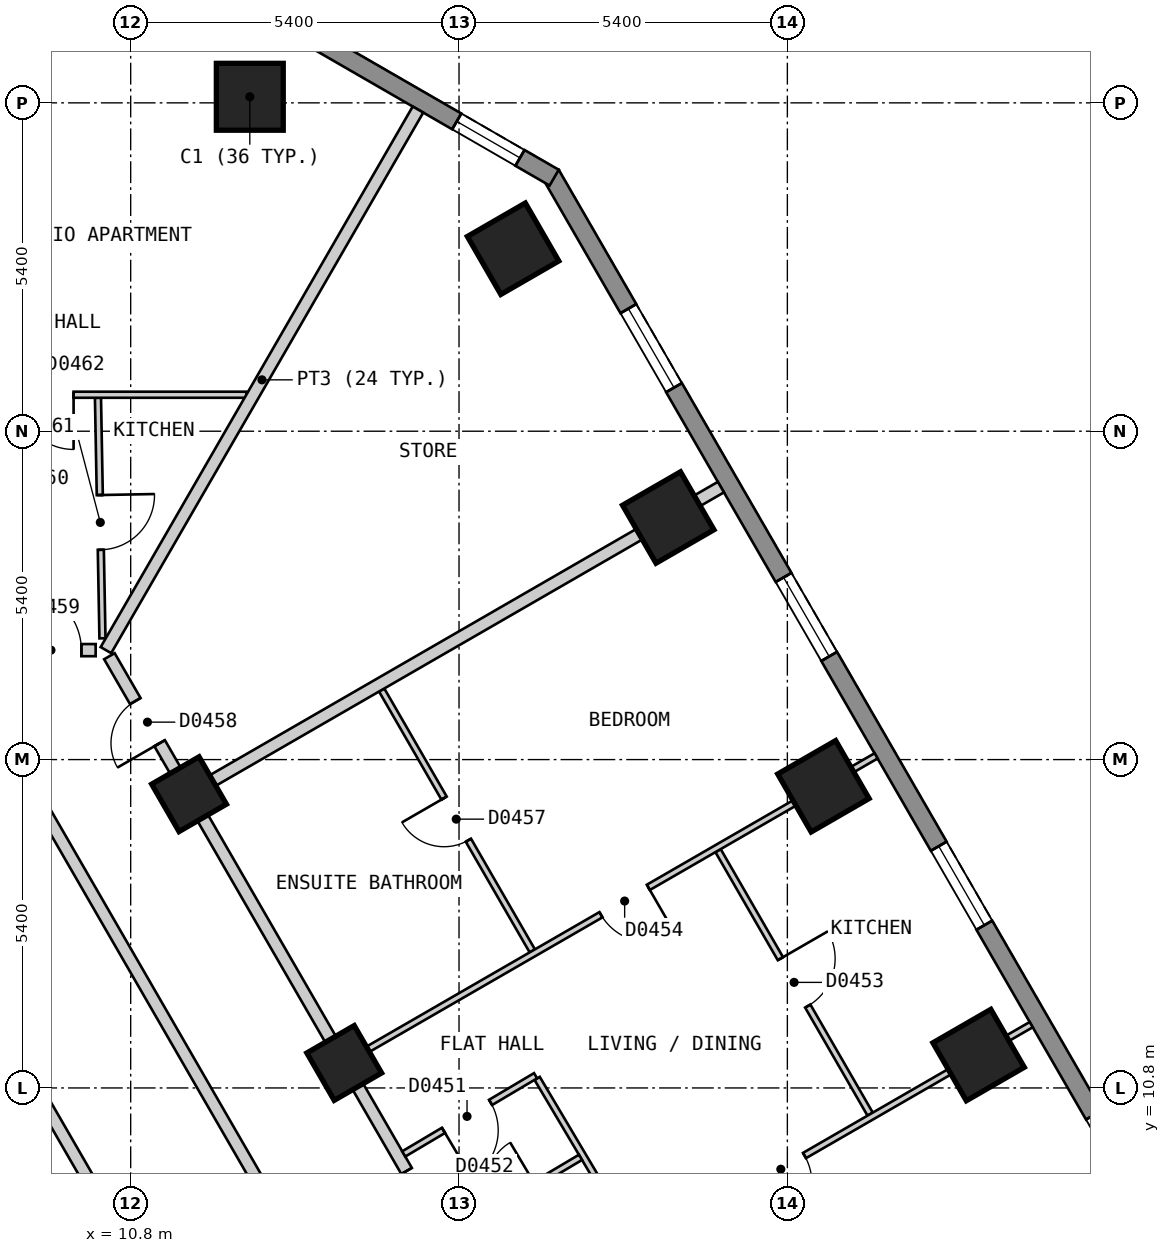
"""IFC4 building model, lengths in metres.
Left out: names, types, materials, properties, quantities, classifications, styles, units other than length and angle.
Written with IfcOpenShell. Run it as: python <this file> out.ifc"""

import sys

from ifc_helpers import new_model, si_unit, direction, frame, frame_2d, origin, origin_2d, place, context, subcontext, project, spatial, polyline, rectangle, outline, extrude, element, fill, save


model = new_model("IFC4")
c1 = context("Model", 3, precision=1e-05, world=origin(), true_north=direction((0.0, 1.0)))
c2 = subcontext(c1, "Body", "Model", "MODEL_VIEW")
j1 = project(units=[si_unit("LENGTHUNIT", "METRE"), si_unit("PLANEANGLEUNIT", "RADIAN")], contexts=[c1])
p1 = place(None, origin())
s1 = spatial("IfcSite", under=j1, at=p1, CompositionType="ELEMENT")
p2 = place(p1, origin())
s2 = spatial("IfcBuilding", under=s1, at=p2, CompositionType="ELEMENT")
p3 = place(p2, frame((0.0, 0.0, 32.4)))
s3 = spatial("IfcBuildingStorey", under=s2, at=p3, CompositionType="ELEMENT", Elevation=32.4)
for number, where, z_axis, x_axis in (
    (1, (12.759, 27.1, 0.0), (0.0, 0.0, 1.0), (-1.0, 0.0, 0.0)),
    (2, (24.745, 11.341, 0.0), (0.0, 0.0, 1.0), (-0.5, 0.866, 0.0)),
    (3, (22.193, 15.761, 0.0), (0.0, 0.0, 1.0), (-0.5, 0.866, 0.0)),
    (4, (19.641, 20.181, 0.0), (0.0, 0.0, 1.0), (-0.5, 0.866, 0.0)),
    (5, (17.089, 24.601, 0.0), (0.0, 0.0, 1.0), (-0.5, 0.866, 0.0)),
):
    element("IfcColumn", number, at=place(p3, frame(where, z_axis=z_axis, x_axis=x_axis)), inside=s3, PredefinedType="COLUMN", context=c2, shape_type="SweptSolid", body=[
        extrude(rectangle(XDim=1.1, YDim=1.1, at=origin_2d()), origin(), (0.0, 0.0, 1.0), 3.0),
    ])
for number, where, z_axis, x_axis in (
    (6, (14.312, 11.211, 0.0), (0.0, 0.0, 1.0), (-0.5, 0.866, 0.0)),
    (7, (11.76, 15.631, 0.0), (0.0, 0.0, 1.0), (-0.5, 0.866, 0.0)),
):
    element("IfcColumn", number, at=place(p3, frame(where, z_axis=z_axis, x_axis=x_axis)), inside=s3, PredefinedType="COLUMN", context=c2, shape_type="SweptSolid", body=[
        extrude(rectangle(XDim=0.9, YDim=0.9, at=origin_2d()), origin(), (0.0, 0.0, 1.0), 3.0),
    ])
p4 = place(p3, frame((31.22, 2.425, 0.0), z_axis=(0.0, 0.0, 1.0), x_axis=(-0.500001938803, 0.866024284413, 0.0)))
e8 = element("IfcWall", 8, at=p4, inside=s3, PredefinedType="SOLIDWALL", context=c2, shape_type="SweptSolid", body=[
    extrude(outline(polyline([(0.0, -0.15), (27.02, -0.15), (26.94, 0.15), (0.08, 0.15), (0.0, -0.15)])), origin(), (0.0, 0.0, 1.0), 2.7),
])
p5 = place(p4, frame((2.553, 0.0, 0.15)))
e9 = element("IfcOpeningElement", 9, at=p5, cuts=e8, PredefinedType="OPENING", context=c2, shape_type="SweptSolid", body=[
    extrude(rectangle(XDim=1.5, YDim=2.1, at=frame_2d((0.75, 1.05))), frame((0.0, 0.16, 0.0), z_axis=(0.0, -1.0, 0.0), x_axis=(1.0, 0.0, 0.0)), (0.0, 0.0, 1.0), 0.32),
])
p6 = place(p4, frame((7.657, 0.0, 0.15)))
e10 = element("IfcOpeningElement", 10, at=p6, cuts=e8, PredefinedType="OPENING", context=c2, shape_type="SweptSolid", body=[
    extrude(rectangle(XDim=1.5, YDim=2.1, at=frame_2d((0.75, 1.05))), frame((0.0, 0.16, 0.0), z_axis=(0.0, -1.0, 0.0), x_axis=(1.0, 0.0, 0.0)), (0.0, 0.0, 1.0), 0.32),
])
p7 = place(p4, frame((12.761, 0.0, 0.15)))
e11 = element("IfcOpeningElement", 11, at=p7, cuts=e8, PredefinedType="OPENING", context=c2, shape_type="SweptSolid", body=[
    extrude(rectangle(XDim=1.5, YDim=2.1, at=frame_2d((0.75, 1.05))), frame((0.0, 0.16, 0.0), z_axis=(0.0, -1.0, 0.0), x_axis=(1.0, 0.0, 0.0)), (0.0, 0.0, 1.0), 0.32),
])
p8 = place(p4, frame((17.865, 0.0, 0.15)))
e12 = element("IfcOpeningElement", 12, at=p8, cuts=e8, PredefinedType="OPENING", context=c2, shape_type="SweptSolid", body=[
    extrude(rectangle(XDim=1.5, YDim=2.1, at=frame_2d((0.75, 1.05))), frame((0.0, 0.16, 0.0), z_axis=(0.0, -1.0, 0.0), x_axis=(1.0, 0.0, 0.0)), (0.0, 0.0, 1.0), 0.32),
])
p9 = place(p4, frame((22.969, 0.0, 0.15)))
e13 = element("IfcOpeningElement", 13, at=p9, cuts=e8, PredefinedType="OPENING", context=c2, shape_type="SweptSolid", body=[
    extrude(rectangle(XDim=1.5, YDim=2.1, at=frame_2d((0.75, 1.05))), frame((0.0, 0.16, 0.0), z_axis=(0.0, -1.0, 0.0), x_axis=(1.0, 0.0, 0.0)), (0.0, 0.0, 1.0), 0.32),
])
p10 = place(p3, frame((17.765, 25.77, 0.0), z_axis=(0.0, 0.0, 1.0), x_axis=(-0.866010750942, 0.50002537861, 0.0)))
e14 = element("IfcWall", 14, at=p10, inside=s3, PredefinedType="SOLIDWALL", context=c2, shape_type="SweptSolid", body=[
    extrude(outline(polyline([(0.0, -0.15), (5.0, -0.15), (4.919, 0.15), (0.08, 0.15), (0.0, -0.15)])), origin(), (0.0, 0.0, 1.0), 2.7),
])
p11 = place(p10, frame((0.65, 0.0, 0.15)))
e15 = element("IfcOpeningElement", 15, at=p11, cuts=e14, PredefinedType="OPENING", context=c2, shape_type="SweptSolid", body=[
    extrude(rectangle(XDim=1.2, YDim=2.1, at=frame_2d((0.6, 1.05))), frame((0.0, 0.16, 0.0), z_axis=(0.0, -1.0, 0.0), x_axis=(1.0, 0.0, 0.0)), (0.0, 0.0, 1.0), 0.32),
])
p12 = place(p3, frame((6.409, 15.7, 0.0), z_axis=(0.0, 0.0, 1.0), x_axis=(0.499930377127, -0.866065596838, 0.0)))
e16 = element("IfcWall", 16, at=p12, inside=s3, PredefinedType="PARTITIONING", context=c2, shape_type="SweptSolid", body=[
    extrude(rectangle(XDim=8.775, YDim=0.2, at=frame_2d((4.388, 0.0))), origin(), (0.0, 0.0, 1.0), 2.7),
])
p13 = place(p3, frame((9.18, 15.7, 0.0), z_axis=(0.0, 0.0, 1.0), x_axis=(0.500003652032, -0.866023295272, 0.0)))
e17 = element("IfcWall", 17, at=p13, inside=s3, PredefinedType="PARTITIONING", context=c2, shape_type="SweptSolid", body=[
    extrude(rectangle(XDim=18.012, YDim=0.2, at=frame_2d((9.006, 0.0))), origin(), (0.0, 0.0, 1.0), 2.7),
])
p14 = place(p13, frame((8.556, 0.0, 0.0)))
e18 = element("IfcOpeningElement", 18, at=p14, cuts=e17, PredefinedType="OPENING", context=c2, shape_type="SweptSolid", body=[
    extrude(rectangle(XDim=0.9, YDim=2.1, at=frame_2d((0.45, 1.05))), frame((0.0, 0.11, 0.0), z_axis=(0.0, -1.0, 0.0), x_axis=(1.0, 0.0, 0.0)), (0.0, 0.0, 1.0), 0.22),
])
p15 = place(p3, frame((10.45, 17.9, 0.0), z_axis=(0.0, 0.0, 1.0), x_axis=(0.500034352617, -0.866005569383, 0.0)))
e19 = element("IfcWall", 19, at=p15, inside=s3, PredefinedType="PARTITIONING", context=c2, shape_type="SweptSolid", body=[
    extrude(rectangle(XDim=20.553, YDim=0.2, at=frame_2d((10.276, 0.0))), origin(), (0.0, 0.0, 1.0), 2.7),
])
p16 = place(p15, frame((9.775, 0.0, 0.0)))
e20 = element("IfcOpeningElement", 20, at=p16, cuts=e19, PredefinedType="OPENING", context=c2, shape_type="SweptSolid", body=[
    extrude(rectangle(XDim=1.0, YDim=2.1, at=frame_2d((0.5, 1.05))), frame((0.0, 0.11, 0.0), z_axis=(0.0, -1.0, 0.0), x_axis=(1.0, 0.0, 0.0)), (0.0, 0.0, 1.0), 0.22),
])
p17 = place(p15, frame((0.852, 0.0, 0.0)))
e21 = element("IfcOpeningElement", 21, at=p17, cuts=e19, PredefinedType="OPENING", context=c2, shape_type="SweptSolid", body=[
    extrude(rectangle(XDim=0.8, YDim=2.1, at=frame_2d((0.4, 1.05))), frame((0.0, 0.11, 0.0), z_axis=(0.0, -1.0, 0.0), x_axis=(1.0, 0.0, 0.0)), (0.0, 0.0, 1.0), 0.22),
])
p18 = place(p3, frame((-10.276, 18.0, 0.0), z_axis=(0.0, 0.0, 1.0), x_axis=(1.0, 0.0, 0.0)))
e22 = element("IfcWall", 22, at=p18, inside=s3, PredefinedType="PARTITIONING", context=c2, shape_type="SweptSolid", body=[
    extrude(rectangle(XDim=20.5, YDim=0.2, at=frame_2d((10.25, 0.0))), origin(), (0.0, 0.0, 1.0), 2.7),
])
p19 = place(p18, frame((19.265, 0.0, 0.0)))
e23 = element("IfcOpeningElement", 23, at=p19, cuts=e22, PredefinedType="OPENING", context=c2, shape_type="SweptSolid", body=[
    extrude(rectangle(XDim=1.0, YDim=2.1, at=frame_2d((0.5, 1.05))), frame((0.0, 0.11, 0.0), z_axis=(0.0, -1.0, 0.0), x_axis=(1.0, 0.0, 0.0)), (0.0, 0.0, 1.0), 0.22),
])
p20 = place(p18, frame((9.775, 0.0, 0.0)))
e24 = element("IfcOpeningElement", 24, at=p20, cuts=e22, PredefinedType="OPENING", context=c2, shape_type="SweptSolid", body=[
    extrude(rectangle(XDim=1.0, YDim=2.1, at=frame_2d((0.5, 1.05))), frame((0.0, 0.11, 0.0), z_axis=(0.0, -1.0, 0.0), x_axis=(1.0, 0.0, 0.0)), (0.0, 0.0, 1.0), 0.22),
])
p21 = place(p18, frame((4.671, 0.0, 0.0)))
e25 = element("IfcOpeningElement", 25, at=p21, cuts=e22, PredefinedType="OPENING", context=c2, shape_type="SweptSolid", body=[
    extrude(rectangle(XDim=1.0, YDim=2.1, at=frame_2d((0.5, 1.05))), frame((0.0, 0.11, 0.0), z_axis=(0.0, -1.0, 0.0), x_axis=(1.0, 0.0, 0.0)), (0.0, 0.0, 1.0), 0.22),
])
p22 = place(p3, frame((17.485, 10.957, 0.0), z_axis=(0.0, 0.0, 1.0), x_axis=(0.510324709283, -0.859981796956, 0.0)))
e26 = element("IfcWall", 26, at=p22, inside=s3, PredefinedType="PARTITIONING", context=c2, shape_type="SweptSolid", body=[
    extrude(rectangle(XDim=3.215, YDim=0.1, at=frame_2d((1.608, 0.0))), origin(), (0.0, 0.0, 1.0), 2.7),
])
p23 = place(p3, frame((14.928, 17.344, 0.0), z_axis=(0.0, 0.0, 1.0), x_axis=(0.500029609304, -0.86600830817, 0.0)))
e27 = element("IfcWall", 27, at=p23, inside=s3, PredefinedType="PARTITIONING", context=c2, shape_type="SweptSolid", body=[
    extrude(rectangle(XDim=4.954, YDim=0.1, at=frame_2d((2.477, 0.0))), origin(), (0.0, 0.0, 1.0), 2.7),
])
p24 = place(p23, frame((2.052, 0.0, 0.0)))
e28 = element("IfcOpeningElement", 28, at=p24, cuts=e27, PredefinedType="OPENING", context=c2, shape_type="SweptSolid", body=[
    extrude(rectangle(XDim=0.8, YDim=2.1, at=frame_2d((0.4, 1.05))), frame((0.0, 0.06, 0.0), z_axis=(0.0, -1.0, 0.0), x_axis=(1.0, 0.0, 0.0)), (0.0, 0.0, 1.0), 0.12),
])
p25 = place(p3, frame((20.46, 14.703, 0.0), z_axis=(0.0, 0.0, 1.0), x_axis=(0.499918186652, -0.866072633591, 0.0)))
e29 = element("IfcWall", 29, at=p25, inside=s3, PredefinedType="PARTITIONING", context=c2, shape_type="SweptSolid", body=[
    extrude(rectangle(XDim=5.003, YDim=0.1, at=frame_2d((2.501, 0.0))), origin(), (0.0, 0.0, 1.0), 2.7),
])
p26 = place(p25, frame((2.052, 0.0, 0.0)))
e30 = element("IfcOpeningElement", 30, at=p26, cuts=e29, PredefinedType="OPENING", context=c2, shape_type="SweptSolid", body=[
    extrude(rectangle(XDim=0.9, YDim=2.1, at=frame_2d((0.45, 1.05))), frame((0.0, 0.06, 0.0), z_axis=(0.0, -1.0, 0.0), x_axis=(1.0, 0.0, 0.0)), (0.0, 0.0, 1.0), 0.12),
])
p27 = place(p3, frame((10.262, 22.15, 0.0), z_axis=(0.0, 0.0, 1.0), x_axis=(0.018696971826, -0.999825196344, 0.0)))
e31 = element("IfcWall", 31, at=p27, inside=s3, PredefinedType="PARTITIONING", context=c2, shape_type="SweptSolid", body=[
    extrude(rectangle(XDim=3.957, YDim=0.1, at=frame_2d((1.978, 0.0))), origin(), (0.0, 0.0, 1.0), 2.7),
])
p28 = place(p27, frame((1.6, 0.0, 0.0)))
e32 = element("IfcOpeningElement", 32, at=p28, cuts=e31, PredefinedType="OPENING", context=c2, shape_type="SweptSolid", body=[
    extrude(rectangle(XDim=0.9, YDim=2.1, at=frame_2d((0.45, 1.05))), frame((0.0, 0.06, 0.0), z_axis=(0.0, -1.0, 0.0), x_axis=(1.0, 0.0, 0.0)), (0.0, 0.0, 1.0), 0.12),
])
p29 = place(p3, frame((7.755, 22.2, 0.0), z_axis=(0.0, 0.0, 1.0), x_axis=(1.0, 0.0, 0.0)))
e33 = element("IfcWall", 33, at=p29, inside=s3, PredefinedType="PARTITIONING", context=c2, shape_type="SweptSolid", body=[
    extrude(rectangle(XDim=4.947, YDim=0.1, at=frame_2d((2.474, 0.0))), origin(), (0.0, 0.0, 1.0), 2.7),
])
p30 = place(p29, frame((1.206, 0.0, 0.0)))
e34 = element("IfcOpeningElement", 34, at=p30, cuts=e33, PredefinedType="OPENING", context=c2, shape_type="SweptSolid", body=[
    extrude(rectangle(XDim=0.9, YDim=2.1, at=frame_2d((0.45, 1.05))), frame((0.0, 0.06, 0.0), z_axis=(0.0, -1.0, 0.0), x_axis=(1.0, 0.0, 0.0)), (0.0, 0.0, 1.0), 0.12),
])
p31 = place(p3, frame((16.95, 6.841, 0.0), z_axis=(0.0, 0.0, 1.0), x_axis=(0.866022959057, 0.500004234368, 0.0)))
e35 = element("IfcWall", 35, at=p31, inside=s3, PredefinedType="PARTITIONING", context=c2, shape_type="SweptSolid", body=[
    extrude(rectangle(XDim=10.0, YDim=0.1, at=frame_2d((5.0, 0.0))), origin(), (0.0, 0.0, 1.0), 2.7),
])
p32 = place(p31, frame((4.795, 0.0, 0.0)))
e36 = element("IfcOpeningElement", 36, at=p32, cuts=e35, PredefinedType="OPENING", context=c2, shape_type="SweptSolid", body=[
    extrude(rectangle(XDim=0.9, YDim=2.1, at=frame_2d((0.45, 1.05))), frame((0.0, 0.06, 0.0), z_axis=(0.0, -1.0, 0.0), x_axis=(1.0, 0.0, 0.0)), (0.0, 0.0, 1.0), 0.12),
])
p33 = place(p3, frame((14.399, 11.261, 0.0), z_axis=(0.0, 0.0, 1.0), x_axis=(0.866022959057, 0.500004234368, 0.0)))
e37 = element("IfcWall", 37, at=p33, inside=s3, PredefinedType="PARTITIONING", context=c2, shape_type="SweptSolid", body=[
    extrude(rectangle(XDim=10.0, YDim=0.1, at=frame_2d((5.0, 0.0))), origin(), (0.0, 0.0, 1.0), 2.7),
])
p34 = place(p33, frame((4.775, 0.0, 0.0)))
e38 = element("IfcOpeningElement", 38, at=p34, cuts=e37, PredefinedType="OPENING", context=c2, shape_type="SweptSolid", body=[
    extrude(rectangle(XDim=0.9, YDim=2.1, at=frame_2d((0.45, 1.05))), frame((0.0, 0.06, 0.0), z_axis=(0.0, -1.0, 0.0), x_axis=(1.0, 0.0, 0.0)), (0.0, 0.0, 1.0), 0.12),
])
p35 = place(p3, frame((16.057, 8.389, 0.0), z_axis=(0.0, 0.0, 1.0), x_axis=(0.860077993161, 0.510162567893, 0.0)))
e39 = element("IfcWall", 39, at=p35, inside=s3, PredefinedType="PARTITIONING", context=c2, shape_type="SweptSolid", body=[
    extrude(rectangle(XDim=2.49, YDim=0.1, at=frame_2d((1.245, 0.0))), origin(), (0.0, 0.0, 1.0), 2.7),
])
p36 = place(p35, frame((0.819, 0.0, 0.0)))
e40 = element("IfcOpeningElement", 40, at=p36, cuts=e39, PredefinedType="OPENING", context=c2, shape_type="SweptSolid", body=[
    extrude(rectangle(XDim=0.8, YDim=2.1, at=frame_2d((0.4, 1.05))), frame((0.0, 0.06, 0.0), z_axis=(0.0, -1.0, 0.0), x_axis=(1.0, 0.0, 0.0)), (0.0, 0.0, 1.0), 0.12),
])
p37 = place(p3, frame((15.291, 9.715, 0.0), z_axis=(0.0, 0.0, 1.0), x_axis=(0.860088508644, 0.51014483953, 0.0)))
e41 = element("IfcWall", 41, at=p37, inside=s3, PredefinedType="PARTITIONING", context=c2, shape_type="SweptSolid", body=[
    extrude(rectangle(XDim=2.521, YDim=0.1, at=frame_2d((1.26, 0.0))), origin(), (0.0, 0.0, 1.0), 2.7),
])
p38 = place(p37, frame((0.76, 0.0, 0.0)))
e42 = element("IfcOpeningElement", 42, at=p38, cuts=e41, PredefinedType="OPENING", context=c2, shape_type="SweptSolid", body=[
    extrude(rectangle(XDim=0.9, YDim=2.1, at=frame_2d((0.45, 1.05))), frame((0.0, 0.06, 0.0), z_axis=(0.0, -1.0, 0.0), x_axis=(1.0, 0.0, 0.0)), (0.0, 0.0, 1.0), 0.12),
])
p39 = place(p3, frame((10.393, 18.0, 0.0), z_axis=(0.0, 0.0, 1.0), x_axis=(0.499945497007, 0.866056868816, 0.0)))
e43 = element("IfcWall", 43, at=p39, inside=s3, PredefinedType="PARTITIONING", context=c2, shape_type="SweptSolid", body=[
    extrude(rectangle(XDim=10.265, YDim=0.2, at=frame_2d((5.132, 0.0))), origin(), (0.0, 0.0, 1.0), 2.7),
])
p40 = place(p3, frame((11.847, 15.681, 0.0), z_axis=(0.0, 0.0, 1.0), x_axis=(0.866022959057, 0.500004234368, 0.0)))
e44 = element("IfcWall", 44, at=p40, inside=s3, PredefinedType="PARTITIONING", context=c2, shape_type="SweptSolid", body=[
    extrude(rectangle(XDim=10.0, YDim=0.2, at=frame_2d((5.0, 0.0))), origin(), (0.0, 0.0, 1.0), 2.7),
])
p41 = place(p7, origin())
e45 = element("IfcWindow", 45, at=p41, inside=s3, PartitioningType="SINGLE_PANEL", PredefinedType="WINDOW", context=c2, shape_type="SweptSolid", body=[
    extrude(rectangle(XDim=1.5, YDim=2.1, at=frame_2d((0.75, 1.05))), frame((0.0, 0.03, 0.0), z_axis=(0.0, -1.0, 0.0), x_axis=(1.0, 0.0, 0.0)), (0.0, 0.0, 1.0), 0.06),
])
fill(e11, e45)
p42 = place(p8, origin())
e46 = element("IfcWindow", 46, at=p42, inside=s3, PartitioningType="SINGLE_PANEL", PredefinedType="WINDOW", context=c2, shape_type="SweptSolid", body=[
    extrude(rectangle(XDim=1.5, YDim=2.1, at=frame_2d((0.75, 1.05))), frame((0.0, 0.03, 0.0), z_axis=(0.0, -1.0, 0.0), x_axis=(1.0, 0.0, 0.0)), (0.0, 0.0, 1.0), 0.06),
])
fill(e12, e46)
p43 = place(p9, origin())
e47 = element("IfcWindow", 47, at=p43, inside=s3, PartitioningType="SINGLE_PANEL", PredefinedType="WINDOW", context=c2, shape_type="SweptSolid", body=[
    extrude(rectangle(XDim=1.5, YDim=2.1, at=frame_2d((0.75, 1.05))), frame((0.0, 0.03, 0.0), z_axis=(0.0, -1.0, 0.0), x_axis=(1.0, 0.0, 0.0)), (0.0, 0.0, 1.0), 0.06),
])
fill(e13, e47)
p44 = place(p11, origin())
e48 = element("IfcWindow", 48, at=p44, inside=s3, PartitioningType="SINGLE_PANEL", PredefinedType="WINDOW", context=c2, shape_type="SweptSolid", body=[
    extrude(rectangle(XDim=1.2, YDim=2.1, at=frame_2d((0.6, 1.05))), frame((0.0, 0.03, 0.0), z_axis=(0.0, -1.0, 0.0), x_axis=(1.0, 0.0, 0.0)), (0.0, 0.0, 1.0), 0.06),
])
fill(e15, e48)
p45 = place(p16, origin())
e49 = element("IfcDoor", 49, at=p45, inside=s3, OperationType="SINGLE_SWING_RIGHT", PredefinedType="DOOR", context=c2, shape_type="SweptSolid", body=[
    extrude(rectangle(XDim=1.0, YDim=2.1, at=frame_2d((0.5, 1.05))), frame((0.0, 0.025, 0.0), z_axis=(0.0, -1.0, 0.0), x_axis=(1.0, 0.0, 0.0)), (0.0, 0.0, 1.0), 0.05),
])
fill(e20, e49)
p46 = place(p38, origin())
e50 = element("IfcDoor", 50, at=p46, inside=s3, OperationType="SINGLE_SWING_LEFT", PredefinedType="DOOR", context=c2, shape_type="SweptSolid", body=[
    extrude(rectangle(XDim=0.9, YDim=2.1, at=frame_2d((0.45, 1.05))), frame((0.0, 0.025, 0.0), z_axis=(0.0, -1.0, 0.0), x_axis=(1.0, 0.0, 0.0)), (0.0, 0.0, 1.0), 0.05),
])
fill(e42, e50)
p47 = place(p26, origin())
e51 = element("IfcDoor", 51, at=p47, inside=s3, OperationType="SINGLE_SWING_LEFT", PredefinedType="DOOR", context=c2, shape_type="SweptSolid", body=[
    extrude(rectangle(XDim=0.9, YDim=2.1, at=frame_2d((0.45, 1.05))), frame((0.0, 0.025, 0.0), z_axis=(0.0, -1.0, 0.0), x_axis=(1.0, 0.0, 0.0)), (0.0, 0.0, 1.0), 0.05),
])
fill(e30, e51)
p48 = place(p34, origin())
e52 = element("IfcDoor", 52, at=p48, inside=s3, OperationType="SINGLE_SWING_RIGHT", PredefinedType="DOOR", context=c2, shape_type="SweptSolid", body=[
    extrude(rectangle(XDim=0.9, YDim=2.1, at=frame_2d((0.45, 1.05))), frame((0.0, 0.025, 0.0), z_axis=(0.0, -1.0, 0.0), x_axis=(1.0, 0.0, 0.0)), (0.0, 0.0, 1.0), 0.05),
])
fill(e38, e52)
p49 = place(p32, origin())
e53 = element("IfcDoor", 53, at=p49, inside=s3, OperationType="SINGLE_SWING_LEFT", PredefinedType="DOOR", context=c2, shape_type="SweptSolid", body=[
    extrude(rectangle(XDim=0.9, YDim=2.1, at=frame_2d((0.45, 1.05))), frame((0.0, 0.025, 0.0), z_axis=(0.0, -1.0, 0.0), x_axis=(1.0, 0.0, 0.0)), (0.0, 0.0, 1.0), 0.05),
])
fill(e36, e53)
p50 = place(p24, origin())
e54 = element("IfcDoor", 54, at=p50, inside=s3, OperationType="SINGLE_SWING_LEFT", PredefinedType="DOOR", context=c2, shape_type="SweptSolid", body=[
    extrude(rectangle(XDim=0.8, YDim=2.1, at=frame_2d((0.4, 1.05))), frame((0.0, 0.025, 0.0), z_axis=(0.0, -1.0, 0.0), x_axis=(1.0, 0.0, 0.0)), (0.0, 0.0, 1.0), 0.05),
])
fill(e28, e54)
p51 = place(p17, origin())
e55 = element("IfcDoor", 55, at=p51, inside=s3, OperationType="SINGLE_SWING_RIGHT", PredefinedType="DOOR", context=c2, shape_type="SweptSolid", body=[
    extrude(rectangle(XDim=0.8, YDim=2.1, at=frame_2d((0.4, 1.05))), frame((0.0, 0.025, 0.0), z_axis=(0.0, -1.0, 0.0), x_axis=(1.0, 0.0, 0.0)), (0.0, 0.0, 1.0), 0.05),
])
fill(e21, e55)
p52 = place(p19, origin())
e56 = element("IfcDoor", 56, at=p52, inside=s3, OperationType="SINGLE_SWING_LEFT", PredefinedType="DOOR", context=c2, shape_type="SweptSolid", body=[
    extrude(rectangle(XDim=1.0, YDim=2.1, at=frame_2d((0.5, 1.05))), frame((0.0, 0.025, 0.0), z_axis=(0.0, -1.0, 0.0), x_axis=(1.0, 0.0, 0.0)), (0.0, 0.0, 1.0), 0.05),
])
fill(e23, e56)
p53 = place(p28, origin())
e57 = element("IfcDoor", 57, at=p53, inside=s3, OperationType="SINGLE_SWING_LEFT", PredefinedType="DOOR", context=c2, shape_type="SweptSolid", body=[
    extrude(rectangle(XDim=0.9, YDim=2.1, at=frame_2d((0.45, 1.05))), frame((0.0, 0.025, 0.0), z_axis=(0.0, -1.0, 0.0), x_axis=(1.0, 0.0, 0.0)), (0.0, 0.0, 1.0), 0.05),
])
fill(e32, e57)
p54 = place(p30, origin())
e58 = element("IfcDoor", 58, at=p54, inside=s3, OperationType="SINGLE_SWING_RIGHT", PredefinedType="DOOR", context=c2, shape_type="SweptSolid", body=[
    extrude(rectangle(XDim=0.9, YDim=2.1, at=frame_2d((0.45, 1.05))), frame((0.0, 0.025, 0.0), z_axis=(0.0, -1.0, 0.0), x_axis=(1.0, 0.0, 0.0)), (0.0, 0.0, 1.0), 0.05),
])
fill(e34, e58)
save(model, sys.argv[1])
